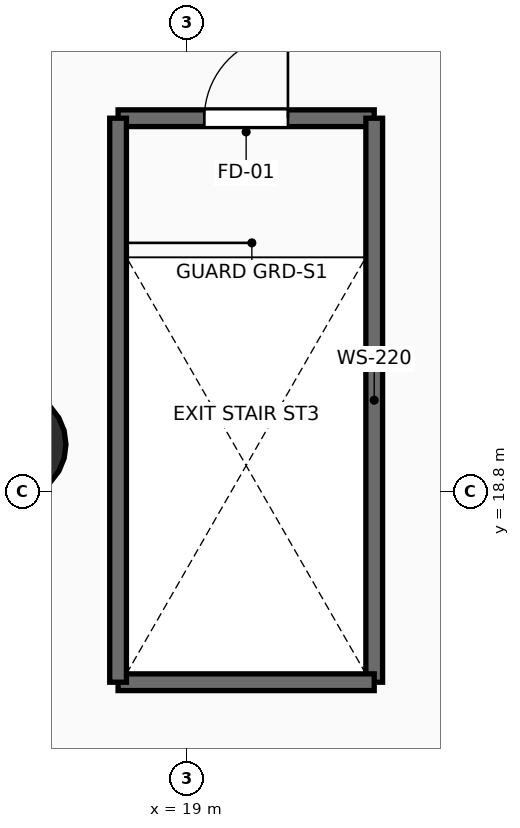
"""IFC4 building model, lengths in metres.
Left out: names, types, materials, properties, quantities, classifications, styles, units other than length and angle.
Written with IfcOpenShell. Run it as: python <this file> out.ifc"""

import sys

from ifc_helpers import new_model, si_unit, direction, frame, frame_2d, origin, origin_2d, place, context, subcontext, project, spatial, rectangle, circle, extrude, element, fill, save


model = new_model("IFC4")
c1 = context("Model", 3, precision=1e-05, world=origin(), true_north=direction((0.0, 1.0)))
c2 = subcontext(c1, "Body", "Model", "MODEL_VIEW")
j1 = project(units=[si_unit("LENGTHUNIT", "METRE"), si_unit("PLANEANGLEUNIT", "RADIAN")], contexts=[c1])
p1 = place(None, origin())
s1 = spatial("IfcSite", under=j1, at=p1, CompositionType="ELEMENT")
p2 = place(p1, origin())
s2 = spatial("IfcBuilding", under=s1, at=p2, CompositionType="ELEMENT")
p3 = place(p2, frame((0.0, 0.0, 19.2)))
s3 = spatial("IfcBuildingStorey", under=s2, at=p3, CompositionType="ELEMENT", Elevation=19.2)
p4 = place(p3, frame((16.705, 19.418, 0.0), z_axis=(0.0, 0.0, 1.0), x_axis=(-0.923879532511, -0.382683432365, 0.0)))
e1 = element("IfcColumn", 1, at=p4, inside=s3, PredefinedType="COLUMN", context=c2, shape_type="SweptSolid", body=[
    extrude(circle(Radius=0.7, at=origin_2d()), origin(), (0.0, 0.0, 1.0), 4.8),
])
p5 = place(p3, frame((18.09, 23.71, 0.0), z_axis=(0.0, 0.0, 1.0), x_axis=(1.0, 0.0, 0.0)))
e2 = element("IfcWall", 2, at=p5, inside=s3, PredefinedType="SOLIDWALL", context=c2, shape_type="SweptSolid", body=[
    extrude(rectangle(XDim=3.37, YDim=0.22, at=frame_2d((1.685, 0.0))), origin(), (0.0, 0.0, 1.0), 4.54),
])
p6 = place(p5, frame((1.135, 0.0, 0.0)))
e3 = element("IfcOpeningElement", 3, at=p6, cuts=e2, PredefinedType="OPENING", context=c2, shape_type="SweptSolid", body=[
    extrude(rectangle(XDim=1.1, YDim=2.15, at=frame_2d((0.55, 1.075))), frame((0.0, 0.125, 0.0), z_axis=(0.0, -1.0, 0.0), x_axis=(1.0, 0.0, 0.0)), (0.0, 0.0, 1.0), 0.25),
])
p7 = place(p3, frame((21.46, 23.71, 0.0), z_axis=(0.0, 0.0, 1.0), x_axis=(0.0, -1.0, 0.0)))
e4 = element("IfcWall", 4, at=p7, inside=s3, PredefinedType="SOLIDWALL", context=c2, shape_type="SweptSolid", body=[
    extrude(rectangle(XDim=7.42, YDim=0.22, at=frame_2d((3.71, 0.0))), origin(), (0.0, 0.0, 1.0), 4.54),
])
p8 = place(p3, frame((21.46, 16.29, 0.0), z_axis=(0.0, 0.0, 1.0), x_axis=(-1.0, 0.0, 0.0)))
e5 = element("IfcWall", 5, at=p8, inside=s3, PredefinedType="SOLIDWALL", context=c2, shape_type="SweptSolid", body=[
    extrude(rectangle(XDim=3.37, YDim=0.22, at=frame_2d((1.685, 0.0))), origin(), (0.0, 0.0, 1.0), 4.54),
])
p9 = place(p3, frame((18.09, 16.29, 0.0), z_axis=(0.0, 0.0, 1.0), x_axis=(0.0, 1.0, 0.0)))
e6 = element("IfcWall", 6, at=p9, inside=s3, PredefinedType="SOLIDWALL", context=c2, shape_type="SweptSolid", body=[
    extrude(rectangle(XDim=7.42, YDim=0.22, at=frame_2d((3.71, 0.0))), origin(), (0.0, 0.0, 1.0), 4.54),
])
p10 = place(p6, origin())
e7 = element("IfcDoor", 7, at=p10, inside=s3, OperationType="SINGLE_SWING_RIGHT", PredefinedType="DOOR", context=c2, shape_type="SweptSolid", body=[
    extrude(rectangle(XDim=1.1, YDim=2.15, at=frame_2d((0.55, 1.075))), frame((0.0, 0.025, 0.0), z_axis=(0.0, -1.0, 0.0), x_axis=(1.0, 0.0, 0.0)), (0.0, 0.0, 1.0), 0.05),
])
fill(e3, e7)
save(model, sys.argv[1])
